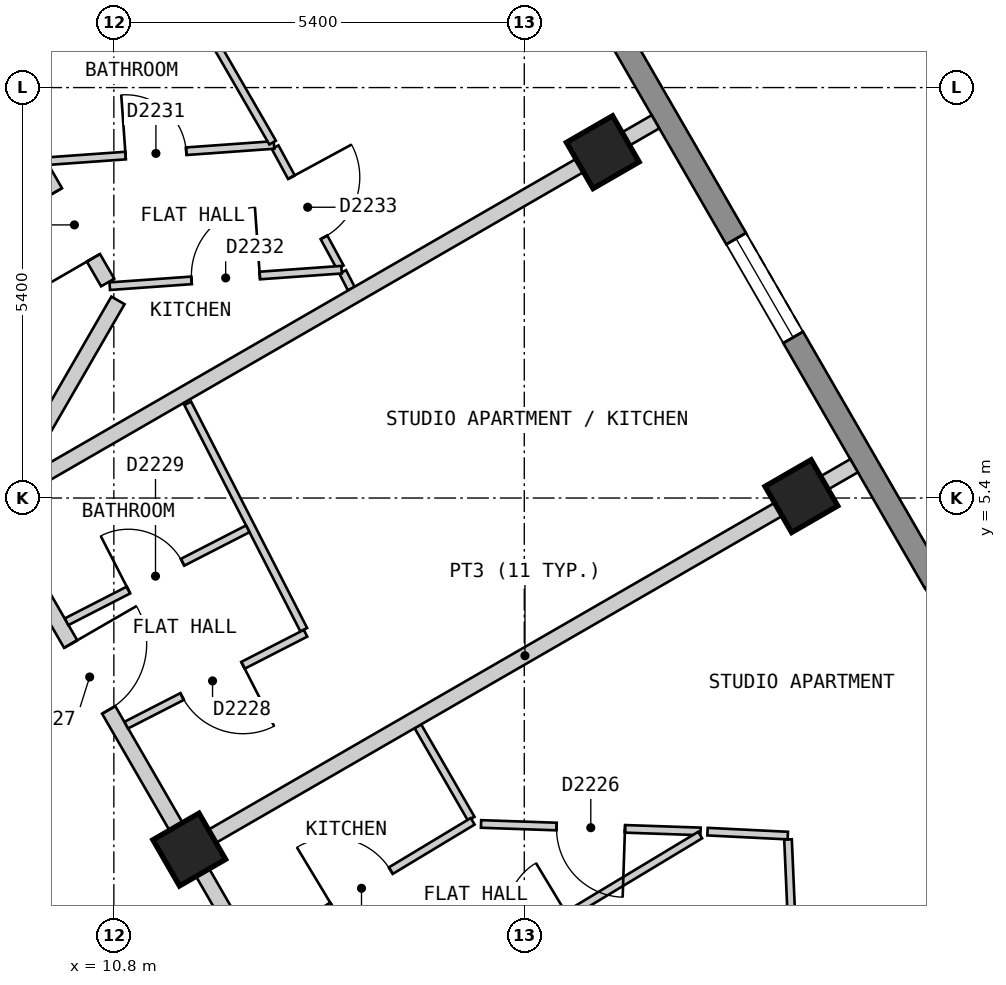
"""IFC4 building model, lengths in metres.
Left out: names, types, materials, properties, quantities, classifications, styles, units other than length and angle.
Written with IfcOpenShell. Run it as: python <this file> out.ifc"""

import sys

from ifc_helpers import new_model, si_unit, direction, frame, frame_2d, origin, origin_2d, place, context, subcontext, project, spatial, polyline, rectangle, outline, extrude, element, fill, save


model = new_model("IFC4")
c1 = context("Model", 3, precision=1e-05, world=origin(), true_north=direction((0.0, 1.0)))
c2 = subcontext(c1, "Body", "Model", "MODEL_VIEW")
j1 = project(units=[si_unit("LENGTHUNIT", "METRE"), si_unit("PLANEANGLEUNIT", "RADIAN")], contexts=[c1])
p1 = place(None, origin())
s1 = spatial("IfcSite", under=j1, at=p1, CompositionType="ELEMENT")
p2 = place(p1, origin())
s2 = spatial("IfcBuilding", under=s1, at=p2, CompositionType="ELEMENT")
p3 = place(p2, frame((0.0, 0.0, 223.8)))
s3 = spatial("IfcBuildingStorey", under=s2, at=p3, CompositionType="ELEMENT", Elevation=223.8)
for number, where, z_axis, x_axis in (
    (1, (19.846, 5.425, 0.0), (0.0, 0.0, 1.0), (-0.5, 0.866, 0.0)),
    (2, (17.233, 9.95, 0.0), (0.0, 0.0, 1.0), (-0.5, 0.866, 0.0)),
    (3, (11.792, 0.775, 0.0), (0.0, 0.0, 1.0), (-0.5, 0.866, 0.0)),
):
    element("IfcColumn", number, at=place(p3, frame(where, z_axis=z_axis, x_axis=x_axis)), inside=s3, PredefinedType="COLUMN", context=c2, shape_type="SweptSolid", body=[
        extrude(rectangle(XDim=0.7, YDim=0.7, at=origin_2d()), origin(), (0.0, 0.0, 1.0), 3.0),
    ])
p4 = place(p3, frame((23.599, 0.825, 0.0), z_axis=(0.0, 0.0, 1.0), x_axis=(-0.500003656944, 0.866023292436, 0.0)))
e4 = element("IfcWall", 4, at=p4, inside=s3, PredefinedType="SOLIDWALL", context=c2, shape_type="SweptSolid", body=[
    extrude(outline(polyline([(0.0, -0.15), (22.17, -0.15), (22.09, 0.15), (0.08, 0.15), (0.0, -0.15)])), origin(), (0.0, 0.0, 1.0), 2.7),
])
p5 = place(p4, frame((2.497, 0.0, 0.15)))
e5 = element("IfcOpeningElement", 5, at=p5, cuts=e4, PredefinedType="OPENING", context=c2, shape_type="SweptSolid", body=[
    extrude(rectangle(XDim=1.5, YDim=2.1, at=frame_2d((0.75, 1.05))), frame((0.0, 0.16, 0.0), z_axis=(0.0, -1.0, 0.0), x_axis=(1.0, 0.0, 0.0)), (0.0, 0.0, 1.0), 0.32),
])
p6 = place(p4, frame((7.723, 0.0, 0.15)))
e6 = element("IfcOpeningElement", 6, at=p6, cuts=e4, PredefinedType="OPENING", context=c2, shape_type="SweptSolid", body=[
    extrude(rectangle(XDim=1.5, YDim=2.1, at=frame_2d((0.75, 1.05))), frame((0.0, 0.16, 0.0), z_axis=(0.0, -1.0, 0.0), x_axis=(1.0, 0.0, 0.0)), (0.0, 0.0, 1.0), 0.32),
])
p7 = place(p4, frame((12.948, 0.0, 0.15)))
e7 = element("IfcOpeningElement", 7, at=p7, cuts=e4, PredefinedType="OPENING", context=c2, shape_type="SweptSolid", body=[
    extrude(rectangle(XDim=1.5, YDim=2.1, at=frame_2d((0.75, 1.05))), frame((0.0, 0.16, 0.0), z_axis=(0.0, -1.0, 0.0), x_axis=(1.0, 0.0, 0.0)), (0.0, 0.0, 1.0), 0.32),
])
p8 = place(p4, frame((18.173, 0.0, 0.15)))
e8 = element("IfcOpeningElement", 8, at=p8, cuts=e4, PredefinedType="OPENING", context=c2, shape_type="SweptSolid", body=[
    extrude(rectangle(XDim=1.5, YDim=2.1, at=frame_2d((0.75, 1.05))), frame((0.0, 0.16, 0.0), z_axis=(0.0, -1.0, 0.0), x_axis=(1.0, 0.0, 0.0)), (0.0, 0.0, 1.0), 0.32),
])
p9 = place(p3, frame((9.238, 5.2, 0.0), z_axis=(0.0, 0.0, 1.0), x_axis=(0.500025705601, -0.86601056214, 0.0)))
e9 = element("IfcWall", 9, at=p9, inside=s3, PredefinedType="PARTITIONING", context=c2, shape_type="SweptSolid", body=[
    extrude(rectangle(XDim=7.735, YDim=0.2, at=frame_2d((3.868, 0.0))), origin(), (0.0, 0.0, 1.0), 2.7),
])
p10 = place(p9, frame((6.898, 0.0, 0.0)))
e10 = element("IfcOpeningElement", 10, at=p10, cuts=e9, PredefinedType="OPENING", context=c2, shape_type="SweptSolid", body=[
    extrude(rectangle(XDim=0.8, YDim=2.1, at=frame_2d((0.4, 1.05))), frame((0.0, 0.11, 0.0), z_axis=(0.0, -1.0, 0.0), x_axis=(1.0, 0.0, 0.0)), (0.0, 0.0, 1.0), 0.22),
])
p11 = place(p9, frame((1.988, 0.0, 0.0)))
e11 = element("IfcOpeningElement", 11, at=p11, cuts=e9, PredefinedType="OPENING", context=c2, shape_type="SweptSolid", body=[
    extrude(rectangle(XDim=1.0, YDim=2.1, at=frame_2d((0.5, 1.05))), frame((0.0, 0.11, 0.0), z_axis=(0.0, -1.0, 0.0), x_axis=(1.0, 0.0, 0.0)), (0.0, 0.0, 1.0), 0.22),
])
p12 = place(p3, frame((5.485, 17.3, 0.0), z_axis=(0.0, 0.0, 1.0), x_axis=(0.500017221754, -0.866015460572, 0.0)))
e12 = element("IfcWall", 12, at=p12, inside=s3, PredefinedType="PARTITIONING", context=c2, shape_type="SweptSolid", body=[
    extrude(rectangle(XDim=10.468, YDim=0.2, at=frame_2d((5.234, 0.0))), origin(), (0.0, 0.0, 1.0), 2.7),
])
p13 = place(p12, frame((9.092, 0.0, 0.0)))
e13 = element("IfcOpeningElement", 13, at=p13, cuts=e12, PredefinedType="OPENING", context=c2, shape_type="SweptSolid", body=[
    extrude(rectangle(XDim=1.0, YDim=2.1, at=frame_2d((0.5, 1.05))), frame((0.0, 0.11, 0.0), z_axis=(0.0, -1.0, 0.0), x_axis=(1.0, 0.0, 0.0)), (0.0, 0.0, 1.0), 0.22),
])
p14 = place(p3, frame((9.354, 5.401, 0.0), z_axis=(0.0, 0.0, 1.0), x_axis=(0.499849222119, 0.866112437936, 0.0)))
e14 = element("IfcWall", 14, at=p14, inside=s3, PredefinedType="PARTITIONING", context=c2, shape_type="SweptSolid", body=[
    extrude(rectangle(XDim=3.001, YDim=0.2, at=frame_2d((1.5, 0.0))), origin(), (0.0, 0.0, 1.0), 2.7),
])
p15 = place(p3, frame((14.8, 2.397, 0.0), z_axis=(0.0, 0.0, 1.0), x_axis=(0.49989805765, -0.866084252228, 0.0)))
e15 = element("IfcWall", 15, at=p15, inside=s3, PredefinedType="PARTITIONING", context=c2, shape_type="SweptSolid", body=[
    extrude(rectangle(XDim=1.404, YDim=0.1, at=frame_2d((0.702, 0.0))), origin(), (0.0, 0.0, 1.0), 2.7),
])
p16 = place(p3, frame((12.922, 10.016, 0.0), z_axis=(0.0, 0.0, 1.0), x_axis=(0.476510550025, -0.879168752695, 0.0)))
e16 = element("IfcWall", 16, at=p16, inside=s3, PredefinedType="PARTITIONING", context=c2, shape_type="SweptSolid", body=[
    extrude(rectangle(XDim=1.798, YDim=0.1, at=frame_2d((0.899, 0.0))), origin(), (0.0, 0.0, 1.0), 2.7),
])
p17 = place(p16, frame((0.449, 0.0, 0.0)))
e17 = element("IfcOpeningElement", 17, at=p17, cuts=e16, PredefinedType="OPENING", context=c2, shape_type="SweptSolid", body=[
    extrude(rectangle(XDim=0.9, YDim=2.1, at=frame_2d((0.45, 1.05))), frame((0.0, 0.06, 0.0), z_axis=(0.0, -1.0, 0.0), x_axis=(1.0, 0.0, 0.0)), (0.0, 0.0, 1.0), 0.12),
])
p18 = place(p3, frame((13.811, 8.375, 0.0), z_axis=(0.0, 0.0, 1.0), x_axis=(0.457058020142, -0.889436881529, 0.0)))
e18 = element("IfcWall", 18, at=p18, inside=s3, PredefinedType="PARTITIONING", context=c2, shape_type="SweptSolid", body=[
    extrude(rectangle(XDim=0.247, YDim=0.1, at=frame_2d((0.124, 0.0))), origin(), (0.0, 0.0, 1.0), 2.7),
])
p19 = place(p3, frame((11.772, 6.646, 0.0), z_axis=(0.0, 0.0, 1.0), x_axis=(0.456175983405, -0.889889584254, 0.0)))
e19 = element("IfcWall", 19, at=p19, inside=s3, PredefinedType="PARTITIONING", context=c2, shape_type="SweptSolid", body=[
    extrude(rectangle(XDim=3.348, YDim=0.1, at=frame_2d((1.674, 0.0))), origin(), (0.0, 0.0, 1.0), 2.7),
])
p20 = place(p3, frame((19.67, 0.909, 0.0), z_axis=(0.0, 0.0, 1.0), x_axis=(0.043933486644, -0.99903445824, 0.0)))
e20 = element("IfcWall", 20, at=p20, inside=s3, PredefinedType="PARTITIONING", context=c2, shape_type="SweptSolid", body=[
    extrude(rectangle(XDim=3.373, YDim=0.1, at=frame_2d((1.687, 0.0))), origin(), (0.0, 0.0, 1.0), 2.7),
])
p21 = place(p3, frame((15.631, 1.112, 0.0), z_axis=(0.0, 0.0, 1.0), x_axis=(0.999423034213, -0.033964668168, 0.0)))
e21 = element("IfcWall", 21, at=p21, inside=s3, PredefinedType="PARTITIONING", context=c2, shape_type="SweptSolid", body=[
    extrude(rectangle(XDim=2.89, YDim=0.1, at=frame_2d((1.445, 0.0))), origin(), (0.0, 0.0, 1.0), 2.7),
])
p22 = place(p21, frame((0.995, 0.0, 0.0)))
e22 = element("IfcOpeningElement", 22, at=p22, cuts=e21, PredefinedType="OPENING", context=c2, shape_type="SweptSolid", body=[
    extrude(rectangle(XDim=0.9, YDim=2.1, at=frame_2d((0.45, 1.05))), frame((0.0, 0.06, 0.0), z_axis=(0.0, -1.0, 0.0), x_axis=(1.0, 0.0, 0.0)), (0.0, 0.0, 1.0), 0.12),
])
p23 = place(p3, frame((10.178, 3.772, 0.0), z_axis=(0.0, 0.0, 1.0), x_axis=(0.889732071959, 0.456483121405, 0.0)))
e23 = element("IfcWall", 23, at=p23, inside=s3, PredefinedType="PARTITIONING", context=c2, shape_type="SweptSolid", body=[
    extrude(rectangle(XDim=2.679, YDim=0.1, at=frame_2d((1.34, 0.0))), origin(), (0.0, 0.0, 1.0), 2.7),
])
p24 = place(p23, frame((0.915, 0.0, 0.0)))
e24 = element("IfcOpeningElement", 24, at=p24, cuts=e23, PredefinedType="OPENING", context=c2, shape_type="SweptSolid", body=[
    extrude(rectangle(XDim=0.8, YDim=2.1, at=frame_2d((0.4, 1.05))), frame((0.0, 0.06, 0.0), z_axis=(0.0, -1.0, 0.0), x_axis=(1.0, 0.0, 0.0)), (0.0, 0.0, 1.0), 0.12),
])
p25 = place(p3, frame((10.963, 2.412, 0.0), z_axis=(0.0, 0.0, 1.0), x_axis=(0.889943997558, 0.456069820543, 0.0)))
e25 = element("IfcWall", 25, at=p25, inside=s3, PredefinedType="PARTITIONING", context=c2, shape_type="SweptSolid", body=[
    extrude(rectangle(XDim=2.651, YDim=0.1, at=frame_2d((1.325, 0.0))), origin(), (0.0, 0.0, 1.0), 2.7),
])
p26 = place(p25, frame((0.826, 0.0, 0.0)))
e26 = element("IfcOpeningElement", 26, at=p26, cuts=e25, PredefinedType="OPENING", context=c2, shape_type="SweptSolid", body=[
    extrude(rectangle(XDim=0.9, YDim=2.1, at=frame_2d((0.45, 1.05))), frame((0.0, 0.06, 0.0), z_axis=(0.0, -1.0, 0.0), x_axis=(1.0, 0.0, 0.0)), (0.0, 0.0, 1.0), 0.12),
])
p27 = place(p3, frame((12.681, -0.564, 0.0), z_axis=(0.0, 0.0, 1.0), x_axis=(0.856575482301, 0.516021746752, 0.0)))
e27 = element("IfcWall", 27, at=p27, inside=s3, PredefinedType="PARTITIONING", context=c2, shape_type="SweptSolid", body=[
    extrude(rectangle(XDim=3.316, YDim=0.1, at=frame_2d((1.658, 0.0))), origin(), (0.0, 0.0, 1.0), 2.7),
])
p28 = place(p27, frame((1.158, 0.0, 0.0)))
e28 = element("IfcOpeningElement", 28, at=p28, cuts=e27, PredefinedType="OPENING", context=c2, shape_type="SweptSolid", body=[
    extrude(rectangle(XDim=0.9, YDim=2.1, at=frame_2d((0.45, 1.05))), frame((0.0, 0.06, 0.0), z_axis=(0.0, -1.0, 0.0), x_axis=(1.0, 0.0, 0.0)), (0.0, 0.0, 1.0), 0.12),
])
p29 = place(p3, frame((14.423, -1.499, 0.0), z_axis=(0.0, 0.0, 1.0), x_axis=(0.856512638305, 0.516126050905, 0.0)))
e29 = element("IfcWall", 29, at=p29, inside=s3, PredefinedType="PARTITIONING", context=c2, shape_type="SweptSolid", body=[
    extrude(rectangle(XDim=4.776, YDim=0.1, at=frame_2d((2.388, 0.0))), origin(), (0.0, 0.0, 1.0), 2.7),
])
p30 = place(p29, frame((1.936, 0.0, 0.0)))
e30 = element("IfcOpeningElement", 30, at=p30, cuts=e29, PredefinedType="OPENING", context=c2, shape_type="SweptSolid", body=[
    extrude(rectangle(XDim=0.8, YDim=2.1, at=frame_2d((0.4, 1.05))), frame((0.0, 0.06, 0.0), z_axis=(0.0, -1.0, 0.0), x_axis=(1.0, 0.0, 0.0)), (0.0, 0.0, 1.0), 0.12),
])
p31 = place(p3, frame((10.746, 8.187, 0.0), z_axis=(0.0, 0.0, 1.0), x_axis=(0.997477310687, 0.070986017387, 0.0)))
e31 = element("IfcWall", 31, at=p31, inside=s3, PredefinedType="PARTITIONING", context=c2, shape_type="SweptSolid", body=[
    extrude(rectangle(XDim=3.058, YDim=0.1, at=frame_2d((1.529, 0.0))), origin(), (0.0, 0.0, 1.0), 2.7),
])
p32 = place(p31, frame((1.079, 0.0, 0.0)))
e32 = element("IfcOpeningElement", 32, at=p32, cuts=e31, PredefinedType="OPENING", context=c2, shape_type="SweptSolid", body=[
    extrude(rectangle(XDim=0.9, YDim=2.1, at=frame_2d((0.45, 1.05))), frame((0.0, 0.06, 0.0), z_axis=(0.0, -1.0, 0.0), x_axis=(1.0, 0.0, 0.0)), (0.0, 0.0, 1.0), 0.12),
])
p33 = place(p3, frame((9.912, 9.831, 0.0), z_axis=(0.0, 0.0, 1.0), x_axis=(0.997459937941, 0.071229714326, 0.0)))
e33 = element("IfcWall", 33, at=p33, inside=s3, PredefinedType="PARTITIONING", context=c2, shape_type="SweptSolid", body=[
    extrude(rectangle(XDim=3.002, YDim=0.1, at=frame_2d((1.501, 0.0))), origin(), (0.0, 0.0, 1.0), 2.7),
])
p34 = place(p33, frame((1.045, 0.0, 0.0)))
e34 = element("IfcOpeningElement", 34, at=p34, cuts=e33, PredefinedType="OPENING", context=c2, shape_type="SweptSolid", body=[
    extrude(rectangle(XDim=0.8, YDim=2.1, at=frame_2d((0.4, 1.05))), frame((0.0, 0.06, 0.0), z_axis=(0.0, -1.0, 0.0), x_axis=(1.0, 0.0, 0.0)), (0.0, 0.0, 1.0), 0.12),
])
p35 = place(p3, frame((11.879, 0.826, 0.0), z_axis=(0.0, 0.0, 1.0), x_axis=(0.866065245018, 0.499930986609, 0.0)))
e35 = element("IfcWall", 35, at=p35, inside=s3, PredefinedType="PARTITIONING", context=c2, shape_type="SweptSolid", body=[
    extrude(rectangle(XDim=10.0, YDim=0.2, at=frame_2d((5.0, 0.0))), origin(), (0.0, 0.0, 1.0), 2.7),
])
p36 = place(p3, frame((9.457, 5.461, 0.0), z_axis=(0.0, 0.0, 1.0), x_axis=(0.866043818878, 0.499968102766, 0.0)))
e36 = element("IfcWall", 36, at=p36, inside=s3, PredefinedType="PARTITIONING", context=c2, shape_type="SweptSolid", body=[
    extrude(rectangle(XDim=9.779, YDim=0.2, at=frame_2d((4.89, 0.0))), origin(), (0.0, 0.0, 1.0), 2.7),
])
p37 = place(p3, frame((9.079, 11.275, 0.0), z_axis=(0.0, 0.0, 1.0), x_axis=(0.866001485781, 0.500041424909, 0.0)))
e37 = element("IfcWall", 37, at=p37, inside=s3, PredefinedType="PARTITIONING", context=c2, shape_type="SweptSolid", body=[
    extrude(rectangle(XDim=7.2, YDim=0.2, at=frame_2d((3.6, 0.0))), origin(), (0.0, 0.0, 1.0), 2.7),
])
p38 = place(p3, frame((18.611, 1.011, 0.0), z_axis=(0.0, 0.0, 1.0), x_axis=(0.998789491469, -0.049188939117, 0.0)))
e38 = element("IfcWall", 38, at=p38, inside=s3, PredefinedType="PARTITIONING", context=c2, shape_type="SweptSolid", body=[
    extrude(rectangle(XDim=1.057, YDim=0.1, at=frame_2d((0.529, 0.0))), origin(), (0.0, 0.0, 1.0), 2.7),
])
p39 = place(p3, frame((11.417, 12.625, 0.0), z_axis=(0.0, 0.0, 1.0), x_axis=(0.500055103712, -0.865993587304, 0.0)))
e39 = element("IfcWall", 39, at=p39, inside=s3, PredefinedType="PARTITIONING", context=c2, shape_type="SweptSolid", body=[
    extrude(rectangle(XDim=2.944, YDim=0.1, at=frame_2d((1.472, 0.0))), origin(), (0.0, 0.0, 1.0), 2.7),
])
p40 = place(p6, origin())
e40 = element("IfcWindow", 40, at=p40, inside=s3, PartitioningType="SINGLE_PANEL", PredefinedType="WINDOW", context=c2, shape_type="SweptSolid", body=[
    extrude(rectangle(XDim=1.5, YDim=2.1, at=frame_2d((0.75, 1.05))), frame((0.0, 0.03, 0.0), z_axis=(0.0, -1.0, 0.0), x_axis=(1.0, 0.0, 0.0)), (0.0, 0.0, 1.0), 0.06),
])
fill(e6, e40)
p41 = place(p28, origin())
e41 = element("IfcDoor", 41, at=p41, inside=s3, OperationType="SINGLE_SWING_LEFT", PredefinedType="DOOR", context=c2, shape_type="SweptSolid", body=[
    extrude(rectangle(XDim=0.9, YDim=2.1, at=frame_2d((0.45, 1.05))), frame((0.0, 0.025, 0.0), z_axis=(0.0, -1.0, 0.0), x_axis=(1.0, 0.0, 0.0)), (0.0, 0.0, 1.0), 0.05),
])
fill(e28, e41)
p42 = place(p22, origin())
e42 = element("IfcDoor", 42, at=p42, inside=s3, OperationType="SINGLE_SWING_RIGHT", PredefinedType="DOOR", context=c2, shape_type="SweptSolid", body=[
    extrude(rectangle(XDim=0.9, YDim=2.1, at=frame_2d((0.45, 1.05))), frame((0.0, 0.025, 0.0), z_axis=(0.0, -1.0, 0.0), x_axis=(1.0, 0.0, 0.0)), (0.0, 0.0, 1.0), 0.05),
])
fill(e22, e42)
p43 = place(p11, origin())
e43 = element("IfcDoor", 43, at=p43, inside=s3, OperationType="SINGLE_SWING_LEFT", PredefinedType="DOOR", context=c2, shape_type="SweptSolid", body=[
    extrude(rectangle(XDim=1.0, YDim=2.1, at=frame_2d((0.5, 1.05))), frame((0.0, 0.025, 0.0), z_axis=(0.0, -1.0, 0.0), x_axis=(1.0, 0.0, 0.0)), (0.0, 0.0, 1.0), 0.05),
])
fill(e11, e43)
p44 = place(p26, origin())
e44 = element("IfcDoor", 44, at=p44, inside=s3, OperationType="SINGLE_SWING_RIGHT", PredefinedType="DOOR", context=c2, shape_type="SweptSolid", body=[
    extrude(rectangle(XDim=0.9, YDim=2.1, at=frame_2d((0.45, 1.05))), frame((0.0, 0.025, 0.0), z_axis=(0.0, -1.0, 0.0), x_axis=(1.0, 0.0, 0.0)), (0.0, 0.0, 1.0), 0.05),
])
fill(e26, e44)
p45 = place(p24, origin())
e45 = element("IfcDoor", 45, at=p45, inside=s3, OperationType="SINGLE_SWING_LEFT", PredefinedType="DOOR", context=c2, shape_type="SweptSolid", body=[
    extrude(rectangle(XDim=0.8, YDim=2.1, at=frame_2d((0.4, 1.05))), frame((0.0, 0.025, 0.0), z_axis=(0.0, -1.0, 0.0), x_axis=(1.0, 0.0, 0.0)), (0.0, 0.0, 1.0), 0.05),
])
fill(e24, e45)
p46 = place(p13, origin())
e46 = element("IfcDoor", 46, at=p46, inside=s3, OperationType="SINGLE_SWING_RIGHT", PredefinedType="DOOR", context=c2, shape_type="SweptSolid", body=[
    extrude(rectangle(XDim=1.0, YDim=2.1, at=frame_2d((0.5, 1.05))), frame((0.0, 0.025, 0.0), z_axis=(0.0, -1.0, 0.0), x_axis=(1.0, 0.0, 0.0)), (0.0, 0.0, 1.0), 0.05),
])
fill(e13, e46)
p47 = place(p34, origin())
e47 = element("IfcDoor", 47, at=p47, inside=s3, OperationType="SINGLE_SWING_LEFT", PredefinedType="DOOR", context=c2, shape_type="SweptSolid", body=[
    extrude(rectangle(XDim=0.8, YDim=2.1, at=frame_2d((0.4, 1.05))), frame((0.0, 0.025, 0.0), z_axis=(0.0, -1.0, 0.0), x_axis=(1.0, 0.0, 0.0)), (0.0, 0.0, 1.0), 0.05),
])
fill(e34, e47)
p48 = place(p32, origin())
e48 = element("IfcDoor", 48, at=p48, inside=s3, OperationType="SINGLE_SWING_RIGHT", PredefinedType="DOOR", context=c2, shape_type="SweptSolid", body=[
    extrude(rectangle(XDim=0.9, YDim=2.1, at=frame_2d((0.45, 1.05))), frame((0.0, 0.025, 0.0), z_axis=(0.0, -1.0, 0.0), x_axis=(1.0, 0.0, 0.0)), (0.0, 0.0, 1.0), 0.05),
])
fill(e32, e48)
p49 = place(p17, origin())
e49 = element("IfcDoor", 49, at=p49, inside=s3, OperationType="SINGLE_SWING_LEFT", PredefinedType="DOOR", context=c2, shape_type="SweptSolid", body=[
    extrude(rectangle(XDim=0.9, YDim=2.1, at=frame_2d((0.45, 1.05))), frame((0.0, 0.025, 0.0), z_axis=(0.0, -1.0, 0.0), x_axis=(1.0, 0.0, 0.0)), (0.0, 0.0, 1.0), 0.05),
])
fill(e17, e49)
save(model, sys.argv[1])
